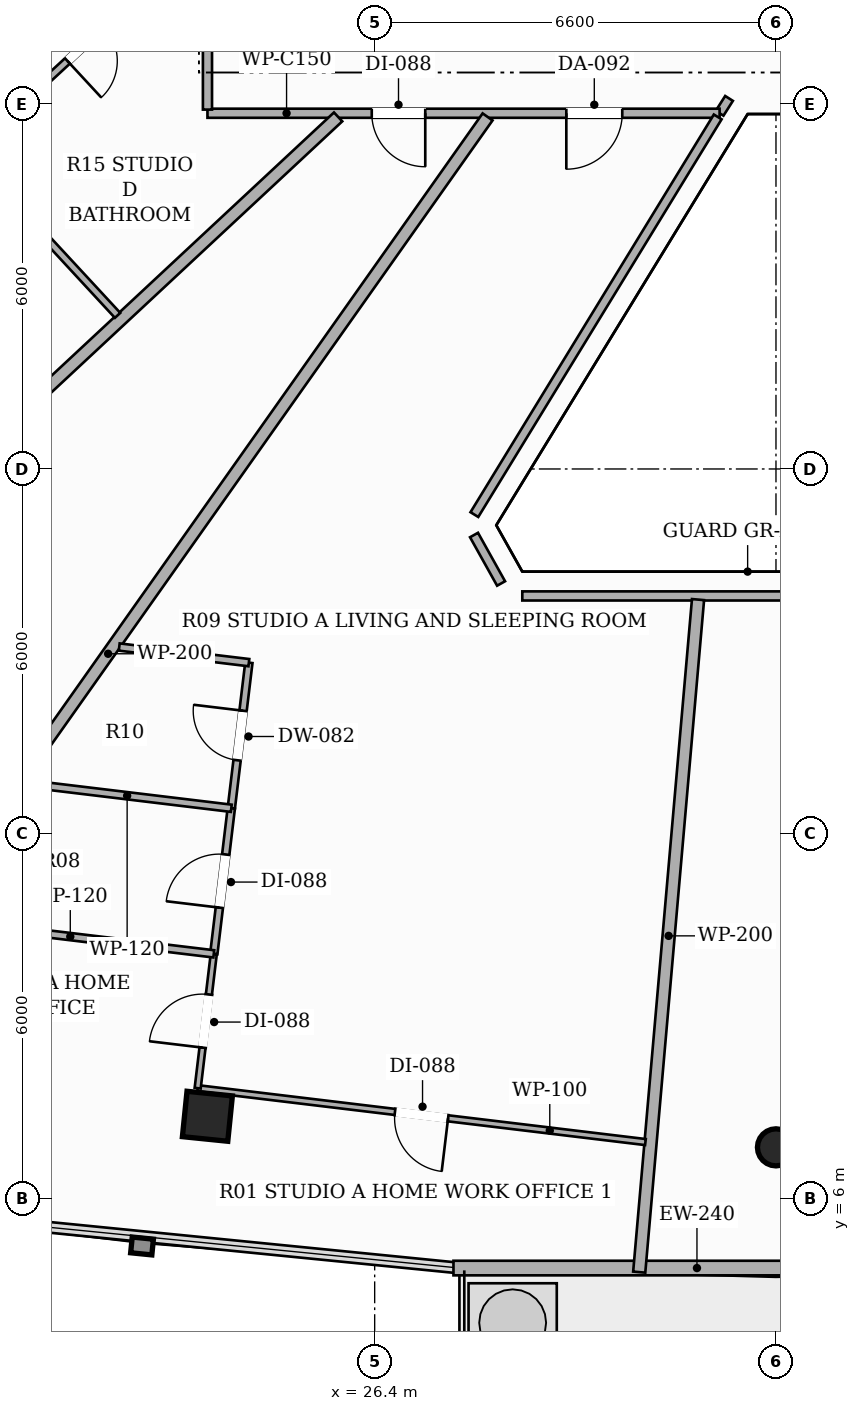
"""IFC4 building model, lengths in metres.
Left out: names, types, materials, properties, quantities, classifications, styles, units other than length and angle.
Written with IfcOpenShell. Run it as: python <this file> out.ifc"""

import sys

from ifc_helpers import new_model, si_unit, direction, frame, frame_2d, origin, origin_2d, place, context, subcontext, project, spatial, rectangle, hollow_rectangle, hollow_circle, extrude, element, fill, save


model = new_model("IFC4")
c1 = context("Model", 3, precision=1e-05, world=origin(), true_north=direction((0.0, 1.0)))
c2 = subcontext(c1, "Body", "Model", "MODEL_VIEW")
j1 = project(units=[si_unit("LENGTHUNIT", "METRE"), si_unit("PLANEANGLEUNIT", "RADIAN")], contexts=[c1])
p1 = place(None, origin())
s1 = spatial("IfcSite", under=j1, at=p1, CompositionType="ELEMENT")
p2 = place(p1, origin())
s2 = spatial("IfcBuilding", under=s1, at=p2, CompositionType="ELEMENT")
p3 = place(p2, frame((0.0, 0.0, 216.2)))
s3 = spatial("IfcBuildingStorey", under=s2, at=p3, CompositionType="ELEMENT", Elevation=216.2)
p4 = place(p3, frame((23.649, 7.355, 0.0), z_axis=(0.0, 0.0, 1.0), x_axis=(-0.994880708829, 0.101056297183, 0.0)))
e1 = element("IfcColumn", 1, at=p4, inside=s3, PredefinedType="COLUMN", context=c2, shape_type="SweptSolid", body=[
    extrude(hollow_rectangle(XDim=0.75, YDim=0.75, WallThickness=0.025, at=origin_2d()), origin(), (0.0, 0.0, 1.0), 3.3),
])
p5 = place(p3, frame((33.0, 6.844, 0.0), z_axis=(0.0, 0.0, 1.0), x_axis=(1.0, 0.0, 0.0)))
e2 = element("IfcColumn", 2, at=p5, inside=s3, PredefinedType="COLUMN", context=c2, shape_type="SweptSolid", body=[
    extrude(hollow_circle(Radius=0.305, WallThickness=0.016, at=origin_2d()), origin(), (0.0, 0.0, 1.0), 3.3),
])
p6 = place(p3, frame((21.458, 33.042, 0.0), z_axis=(0.0, 0.0, 1.0), x_axis=(-0.51433465168, -0.857589567381, 0.0)))
e3 = element("IfcWall", 3, at=p6, inside=s3, PredefinedType="SOLIDWALL", context=c2, shape_type="SweptSolid", body=[
    extrude(rectangle(XDim=10.252, YDim=0.24, at=frame_2d((5.126, 0.0))), origin(), (0.0, 0.0, 1.0), 2.624),
])
p7 = place(p6, frame((7.754, 0.0, 0.0)))
e4 = element("IfcOpeningElement", 4, at=p7, cuts=e3, PredefinedType="OPENING", context=c2, shape_type="SweptSolid", body=[
    extrude(rectangle(XDim=1.8, YDim=2.2, at=frame_2d((0.9, 1.1))), frame((0.0, 0.13, 0.0), z_axis=(0.0, -1.0, 0.0), x_axis=(1.0, 0.0, 0.0)), (0.0, 0.0, 1.0), 0.26),
])
p8 = place(p3, frame((27.696, 4.859, 0.0), z_axis=(0.0, 0.0, 1.0), x_axis=(1.0, 0.0, 0.0)))
e5 = element("IfcWall", 5, at=p8, inside=s3, PredefinedType="SOLIDWALL", context=c2, shape_type="SweptSolid", body=[
    extrude(rectangle(XDim=10.608, YDim=0.24, at=frame_2d((5.304, 0.0))), origin(), (0.0, 0.0, 1.0), 2.624),
])
p9 = place(p8, frame((8.109, 0.0, 0.0)))
e6 = element("IfcOpeningElement", 6, at=p9, cuts=e5, PredefinedType="OPENING", context=c2, shape_type="SweptSolid", body=[
    extrude(rectangle(XDim=1.8, YDim=2.2, at=frame_2d((0.9, 1.1))), frame((0.0, 0.13, 0.0), z_axis=(0.0, -1.0, 0.0), x_axis=(1.0, 0.0, 0.0)), (0.0, 0.0, 1.0), 0.26),
])
p10 = place(p3, frame((32.228, 24.094, 0.0), z_axis=(0.0, 0.0, 1.0), x_axis=(-0.53643811989, -0.843939656331, 0.0)))
e7 = element("IfcWall", 7, at=p10, inside=s3, PredefinedType="PARTITIONING", context=c2, shape_type="SweptSolid", body=[
    extrude(rectangle(XDim=0.289, YDim=0.15, at=frame_2d((0.145, 0.0))), origin(), (0.0, 0.0, 1.0), 3.06),
])
p11 = place(p3, frame((32.073, 23.85, 0.0), z_axis=(0.0, 0.0, 1.0), x_axis=(-1.0, 0.0, 0.0)))
e8 = element("IfcWall", 8, at=p11, inside=s3, PredefinedType="PARTITIONING", context=c2, shape_type="SweptSolid", body=[
    extrude(rectangle(XDim=8.423, YDim=0.15, at=frame_2d((4.211, 0.0))), origin(), (0.0, 0.0, 1.0), 2.565),
])
p12 = place(p11, frame((1.601, 0.0, 0.0)))
e9 = element("IfcOpeningElement", 9, at=p12, cuts=e8, PredefinedType="OPENING", context=c2, shape_type="SweptSolid", body=[
    extrude(rectangle(XDim=0.92, YDim=2.15, at=frame_2d((0.46, 1.075))), frame((0.0, 0.085, 0.0), z_axis=(0.0, -1.0, 0.0), x_axis=(1.0, 0.0, 0.0)), (0.0, 0.0, 1.0), 0.17),
])
p13 = place(p11, frame((4.841, 0.0, 0.0)))
e10 = element("IfcOpeningElement", 10, at=p13, cuts=e8, PredefinedType="OPENING", context=c2, shape_type="SweptSolid", body=[
    extrude(rectangle(XDim=0.88, YDim=2.1, at=frame_2d((0.44, 1.05))), frame((0.0, 0.085, 0.0), z_axis=(0.0, -1.0, 0.0), x_axis=(1.0, 0.0, 0.0)), (0.0, 0.0, 1.0), 0.17),
])
p14 = place(p3, frame((23.65, 23.91, 0.0), z_axis=(0.0, 0.0, 1.0), x_axis=(0.0, 1.0, 0.0)))
e11 = element("IfcWall", 11, at=p14, inside=s3, PredefinedType="PARTITIONING", context=c2, shape_type="SweptSolid", body=[
    extrude(rectangle(XDim=12.163, YDim=0.15, at=frame_2d((6.082, 0.0))), origin(), (0.0, 0.0, 1.0), 2.492),
])
p15 = place(p14, frame((5.622, 0.0, 0.0)))
e12 = element("IfcOpeningElement", 12, at=p15, cuts=e11, PredefinedType="OPENING", context=c2, shape_type="SweptSolid", body=[
    extrude(rectangle(XDim=0.92, YDim=2.15, at=frame_2d((0.46, 1.075))), frame((0.0, 0.085, 0.0), z_axis=(0.0, -1.0, 0.0), x_axis=(1.0, 0.0, 0.0)), (0.0, 0.0, 1.0), 0.17),
])
p16 = place(p3, frame((37.172, 15.912, 0.0), z_axis=(0.0, 0.0, 1.0), x_axis=(-1.0, 0.0, 0.0)))
e13 = element("IfcWall", 13, at=p16, inside=s3, PredefinedType="PARTITIONING", context=c2, shape_type="SweptSolid", body=[
    extrude(rectangle(XDim=8.344, YDim=0.15, at=frame_2d((4.172, 0.0))), origin(), (0.0, 0.0, 1.0), 2.773),
])
p17 = place(p3, frame((28.479, 16.117, 0.0), z_axis=(0.0, 0.0, 1.0), x_axis=(-0.487503666908, 0.873120939361, 0.0)))
e14 = element("IfcWall", 14, at=p17, inside=s3, PredefinedType="PARTITIONING", context=c2, shape_type="SweptSolid", body=[
    extrude(rectangle(XDim=0.913, YDim=0.15, at=frame_2d((0.457, 0.0))), origin(), (0.0, 0.0, 1.0), 3.06),
])
p18 = place(p3, frame((28.04, 17.25, 0.0), z_axis=(0.0, 0.0, 1.0), x_axis=(0.521949656317, 0.852976292912, 0.0)))
e15 = element("IfcWall", 15, at=p18, inside=s3, PredefinedType="PARTITIONING", context=c2, shape_type="SweptSolid", body=[
    extrude(rectangle(XDim=7.667, YDim=0.15, at=frame_2d((3.833, 0.0))), origin(), (0.0, 0.0, 1.0), 2.773),
])
p19 = place(p3, frame((31.718, 15.852, 0.0), z_axis=(0.0, 0.0, 1.0), x_axis=(-0.087103117533, -0.996199300801, 0.0)))
e16 = element("IfcWall", 16, at=p19, inside=s3, PredefinedType="PARTITIONING", context=c2, shape_type="SweptSolid", body=[
    extrude(rectangle(XDim=11.102, YDim=0.2, at=frame_2d((5.551, 0.0))), origin(), (0.0, 0.0, 1.0), 2.492),
])
p20 = place(p3, frame((15.776, 6.132, 0.0), z_axis=(0.0, 0.0, 1.0), x_axis=(0.577200381612, 0.816602546816, 0.0)))
e17 = element("IfcWall", 17, at=p20, inside=s3, PredefinedType="PARTITIONING", context=c2, shape_type="SweptSolid", body=[
    extrude(rectangle(XDim=21.624, YDim=0.2, at=frame_2d((10.812, 0.0))), origin(), (0.0, 0.0, 1.0), 2.492),
])
p21 = place(p3, frame((25.799, 23.79, 0.0), z_axis=(0.0, 0.0, 1.0), x_axis=(-0.731584830333, -0.681750420629, 0.0)))
e18 = element("IfcWall", 18, at=p21, inside=s3, PredefinedType="PARTITIONING", context=c2, shape_type="SweptSolid", body=[
    extrude(rectangle(XDim=21.776, YDim=0.2, at=frame_2d((10.888, 0.0))), origin(), (0.0, 0.0, 1.0), 2.492),
])
p22 = place(p3, frame((24.042, 12.42, 0.0), z_axis=(0.0, 0.0, 1.0), x_axis=(0.119823599825, 0.992795197876, 0.0)))
e19 = element("IfcWall", 19, at=p22, inside=s3, PredefinedType="PARTITIONING", context=c2, shape_type="SweptSolid", body=[
    extrude(rectangle(XDim=2.412, YDim=0.12, at=frame_2d((1.206, 0.0))), origin(), (0.0, 0.0, 1.0), 3.06),
])
p23 = place(p22, frame((0.796, 0.0, 0.0)))
e20 = element("IfcOpeningElement", 20, at=p23, cuts=e19, PredefinedType="OPENING", context=c2, shape_type="SweptSolid", body=[
    extrude(rectangle(XDim=0.82, YDim=2.1, at=frame_2d((0.41, 1.05))), frame((0.0, 0.07, 0.0), z_axis=(0.0, -1.0, 0.0), x_axis=(1.0, 0.0, 0.0)), (0.0, 0.0, 1.0), 0.14),
])
p24 = place(p3, frame((24.331, 14.815, 0.0), z_axis=(0.0, 0.0, 1.0), x_axis=(-0.992808897326, 0.119710038805, 0.0)))
e21 = element("IfcWall", 21, at=p24, inside=s3, PredefinedType="PARTITIONING", context=c2, shape_type="SweptSolid", body=[
    extrude(rectangle(XDim=2.147, YDim=0.12, at=frame_2d((1.074, 0.0))), origin(), (0.0, 0.0, 1.0), 3.06),
])
p25 = place(p3, frame((23.754, 10.026, 0.0), z_axis=(0.0, 0.0, 1.0), x_axis=(0.119472593193, 0.992837499028, 0.0)))
e22 = element("IfcWall", 22, at=p25, inside=s3, PredefinedType="PARTITIONING", context=c2, shape_type="SweptSolid", body=[
    extrude(rectangle(XDim=2.411, YDim=0.12, at=frame_2d((1.206, 0.0))), origin(), (0.0, 0.0, 1.0), 3.06),
])
p26 = place(p25, frame((0.766, 0.0, 0.0)))
e23 = element("IfcOpeningElement", 23, at=p26, cuts=e22, PredefinedType="OPENING", context=c2, shape_type="SweptSolid", body=[
    extrude(rectangle(XDim=0.88, YDim=2.1, at=frame_2d((0.44, 1.05))), frame((0.0, 0.07, 0.0), z_axis=(0.0, -1.0, 0.0), x_axis=(1.0, 0.0, 0.0)), (0.0, 0.0, 1.0), 0.14),
])
p27 = place(p3, frame((30.853, 6.931, 0.0), z_axis=(0.0, 0.0, 1.0), x_axis=(-0.992840033501, 0.119451529409, 0.0)))
e24 = element("IfcWall", 24, at=p27, inside=s3, PredefinedType="PARTITIONING", context=c2, shape_type="SweptSolid", body=[
    extrude(rectangle(XDim=7.417, YDim=0.1, at=frame_2d((3.708, 0.0))), origin(), (0.0, 0.0, 1.0), 2.492),
])
p28 = place(p27, frame((3.269, 0.0, 0.0)))
e25 = element("IfcOpeningElement", 25, at=p28, cuts=e24, PredefinedType="OPENING", context=c2, shape_type="SweptSolid", body=[
    extrude(rectangle(XDim=0.88, YDim=2.1, at=frame_2d((0.44, 1.05))), frame((0.0, 0.06, 0.0), z_axis=(0.0, -1.0, 0.0), x_axis=(1.0, 0.0, 0.0)), (0.0, 0.0, 1.0), 0.12),
])
p29 = place(p3, frame((23.489, 7.817, 0.0), z_axis=(0.0, 0.0, 1.0), x_axis=(0.119063005136, 0.992886700892, 0.0)))
e26 = element("IfcWall", 26, at=p29, inside=s3, PredefinedType="PARTITIONING", context=c2, shape_type="SweptSolid", body=[
    extrude(rectangle(XDim=2.225, YDim=0.1, at=frame_2d((1.112, 0.0))), origin(), (0.0, 0.0, 1.0), 2.492),
])
p30 = place(p29, frame((0.672, 0.0, 0.0)))
e27 = element("IfcOpeningElement", 27, at=p30, cuts=e26, PredefinedType="OPENING", context=c2, shape_type="SweptSolid", body=[
    extrude(rectangle(XDim=0.88, YDim=2.1, at=frame_2d((0.44, 1.05))), frame((0.0, 0.06, 0.0), z_axis=(0.0, -1.0, 0.0), x_axis=(1.0, 0.0, 0.0)), (0.0, 0.0, 1.0), 0.12),
])
p31 = place(p3, frame((24.042, 12.42, 0.0), z_axis=(0.0, 0.0, 1.0), x_axis=(-0.992809391247, 0.119705942421, 0.0)))
e28 = element("IfcWall", 28, at=p31, inside=s3, PredefinedType="PARTITIONING", context=c2, shape_type="SweptSolid", body=[
    extrude(rectangle(XDim=3.451, YDim=0.12, at=frame_2d((1.726, 0.0))), origin(), (0.0, 0.0, 1.0), 2.773),
])
p32 = place(p3, frame((23.754, 10.026, 0.0), z_axis=(0.0, 0.0, 1.0), x_axis=(-0.992834006213, 0.1195016155, 0.0)))
e29 = element("IfcWall", 29, at=p32, inside=s3, PredefinedType="PARTITIONING", context=c2, shape_type="SweptSolid", body=[
    extrude(rectangle(XDim=4.754, YDim=0.12, at=frame_2d((2.377, 0.0))), origin(), (0.0, 0.0, 1.0), 2.773),
])
p33 = place(p3, frame((23.59, 26.786, 0.0), z_axis=(0.0, 0.0, 1.0), x_axis=(-0.733888422473, -0.679270037143, 0.0)))
e30 = element("IfcWall", 30, at=p33, inside=s3, PredefinedType="PARTITIONING", context=c2, shape_type="SweptSolid", body=[
    extrude(rectangle(XDim=5.292, YDim=0.12, at=frame_2d((2.646, 0.0))), origin(), (0.0, 0.0, 1.0), 3.06),
])
p34 = place(p33, frame((2.236, 0.0, 0.0)))
e31 = element("IfcOpeningElement", 31, at=p34, cuts=e30, PredefinedType="OPENING", context=c2, shape_type="SweptSolid", body=[
    extrude(rectangle(XDim=0.82, YDim=2.1, at=frame_2d((0.41, 1.05))), frame((0.0, 0.07, 0.0), z_axis=(0.0, -1.0, 0.0), x_axis=(1.0, 0.0, 0.0)), (0.0, 0.0, 1.0), 0.14),
])
p35 = place(p3, frame((22.172, 20.526, 0.0), z_axis=(0.0, 0.0, 1.0), x_axis=(-0.67917603964, 0.733975413198, 0.0)))
e32 = element("IfcWall", 32, at=p35, inside=s3, PredefinedType="PARTITIONING", context=c2, shape_type="SweptSolid", body=[
    extrude(rectangle(XDim=3.631, YDim=0.12, at=frame_2d((1.815, 0.0))), origin(), (0.0, 0.0, 1.0), 2.565),
])
p36 = place(p12, origin())
e33 = element("IfcDoor", 33, at=p36, inside=s3, OperationType="SINGLE_SWING_RIGHT", PredefinedType="DOOR", context=c2, shape_type="SweptSolid", body=[
    extrude(rectangle(XDim=0.92, YDim=2.15, at=frame_2d((0.46, 1.075))), frame((0.0, 0.025, 0.0), z_axis=(0.0, -1.0, 0.0), x_axis=(1.0, 0.0, 0.0)), (0.0, 0.0, 1.0), 0.05),
])
fill(e9, e33)
p37 = place(p23, origin())
e34 = element("IfcDoor", 34, at=p37, inside=s3, OperationType="SINGLE_SWING_RIGHT", PredefinedType="DOOR", context=c2, shape_type="SweptSolid", body=[
    extrude(rectangle(XDim=0.82, YDim=2.1, at=frame_2d((0.41, 1.05))), frame((0.0, 0.025, 0.0), z_axis=(0.0, -1.0, 0.0), x_axis=(1.0, 0.0, 0.0)), (0.0, 0.0, 1.0), 0.05),
])
fill(e20, e34)
p38 = place(p26, origin())
e35 = element("IfcDoor", 35, at=p38, inside=s3, OperationType="SINGLE_SWING_LEFT", PredefinedType="DOOR", context=c2, shape_type="SweptSolid", body=[
    extrude(rectangle(XDim=0.88, YDim=2.1, at=frame_2d((0.44, 1.05))), frame((0.0, 0.025, 0.0), z_axis=(0.0, -1.0, 0.0), x_axis=(1.0, 0.0, 0.0)), (0.0, 0.0, 1.0), 0.05),
])
fill(e23, e35)
p39 = place(p28, origin())
e36 = element("IfcDoor", 36, at=p39, inside=s3, OperationType="SINGLE_SWING_LEFT", PredefinedType="DOOR", context=c2, shape_type="SweptSolid", body=[
    extrude(rectangle(XDim=0.88, YDim=2.1, at=frame_2d((0.44, 1.05))), frame((0.0, 0.025, 0.0), z_axis=(0.0, -1.0, 0.0), x_axis=(1.0, 0.0, 0.0)), (0.0, 0.0, 1.0), 0.05),
])
fill(e25, e36)
p40 = place(p30, origin())
e37 = element("IfcDoor", 37, at=p40, inside=s3, OperationType="SINGLE_SWING_LEFT", PredefinedType="DOOR", context=c2, shape_type="SweptSolid", body=[
    extrude(rectangle(XDim=0.88, YDim=2.1, at=frame_2d((0.44, 1.05))), frame((0.0, 0.025, 0.0), z_axis=(0.0, -1.0, 0.0), x_axis=(1.0, 0.0, 0.0)), (0.0, 0.0, 1.0), 0.05),
])
fill(e27, e37)
p41 = place(p34, origin())
e38 = element("IfcDoor", 38, at=p41, inside=s3, OperationType="SINGLE_SWING_RIGHT", PredefinedType="DOOR", context=c2, shape_type="SweptSolid", body=[
    extrude(rectangle(XDim=0.82, YDim=2.1, at=frame_2d((0.41, 1.05))), frame((0.0, 0.025, 0.0), z_axis=(0.0, -1.0, 0.0), x_axis=(1.0, 0.0, 0.0)), (0.0, 0.0, 1.0), 0.05),
])
fill(e31, e38)
p42 = place(p13, origin())
e39 = element("IfcDoor", 39, at=p42, inside=s3, OperationType="SINGLE_SWING_LEFT", PredefinedType="DOOR", context=c2, shape_type="SweptSolid", body=[
    extrude(rectangle(XDim=0.88, YDim=2.1, at=frame_2d((0.44, 1.05))), frame((0.0, 0.025, 0.0), z_axis=(0.0, -1.0, 0.0), x_axis=(1.0, 0.0, 0.0)), (0.0, 0.0, 1.0), 0.05),
])
fill(e10, e39)
save(model, sys.argv[1])
